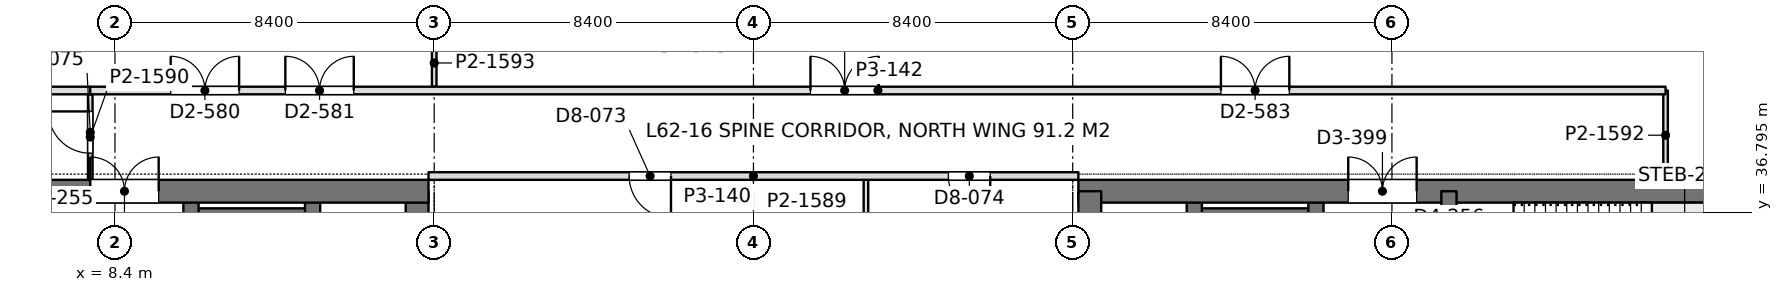
"""IFC4 building model, lengths in metres.
Left out: names, types, materials, properties, quantities, classifications, styles, units other than length and angle.
Written with IfcOpenShell. Run it as: python <this file> out.ifc"""

import sys

from ifc_helpers import new_model, si_unit, direction, frame, frame_2d, origin, place, context, subcontext, project, spatial, rectangle, extrude, element, fill, save


model = new_model("IFC4")
c1 = context("Model", 3, precision=1e-05, world=origin(), true_north=direction((0.0, 1.0)))
c2 = subcontext(c1, "Body", "Model", "MODEL_VIEW")
j1 = project(units=[si_unit("LENGTHUNIT", "METRE"), si_unit("PLANEANGLEUNIT", "RADIAN")], contexts=[c1])
p1 = place(None, origin())
s1 = spatial("IfcSite", under=j1, at=p1, CompositionType="ELEMENT")
p2 = place(p1, origin())
s2 = spatial("IfcBuilding", under=s1, at=p2, CompositionType="ELEMENT")
p3 = place(p2, frame((0.0, 0.0, 272.7)))
s3 = spatial("IfcBuildingStorey", under=s2, at=p3, CompositionType="ELEMENT", Elevation=272.7)
p4 = place(p3, frame((-1.05, 37.35, 0.0), z_axis=(0.0, 0.0, 1.0), x_axis=(1.0, 0.0, 0.0)))
e1 = element("IfcWall", 1, at=p4, inside=s3, PredefinedType="SHEAR", context=c2, shape_type="SweptSolid", body=[
    extrude(rectangle(XDim=17.7, YDim=0.6, at=frame_2d((8.85, 0.0))), origin(), (0.0, 0.0, 1.0), 4.5),
])
p5 = place(p4, frame((8.8, 0.0, 0.0)))
e2 = element("IfcOpeningElement", 2, at=p5, cuts=e1, PredefinedType="OPENING", context=c2, shape_type="SweptSolid", body=[
    extrude(rectangle(XDim=1.8, YDim=2.4, at=frame_2d((0.9, 1.2))), frame((0.0, 0.31, 0.0), z_axis=(0.0, -1.0, 0.0), x_axis=(1.0, 0.0, 0.0)), (0.0, 0.0, 1.0), 0.62),
])
p6 = place(p3, frame((16.35, 27.8, 0.0), z_axis=(0.0, 0.0, 1.0), x_axis=(0.0, 1.0, 0.0)))
e3 = element("IfcWall", 3, at=p6, inside=s3, PredefinedType="SHEAR", context=c2, shape_type="SweptSolid", body=[
    extrude(rectangle(XDim=9.55, YDim=0.6, at=frame_2d((4.775, 0.0))), origin(), (0.0, 0.0, 1.0), 4.5),
])
p7 = place(p3, frame((6.9, 13.05, 0.0), z_axis=(0.0, 0.0, 1.0), x_axis=(0.0, 1.0, 0.0)))
e4 = element("IfcWall", 4, at=p7, inside=s3, PredefinedType="SHEAR", context=c2, shape_type="SweptSolid", body=[
    extrude(rectangle(XDim=24.3, YDim=0.4, at=frame_2d((12.15, 0.0))), origin(), (0.0, 0.0, 1.0), 4.5),
])
p8 = place(p7, frame((1.3, 0.0, 0.0)))
e5 = element("IfcOpeningElement", 5, at=p8, cuts=e4, PredefinedType="OPENING", context=c2, shape_type="SweptSolid", body=[
    extrude(rectangle(XDim=1.0, YDim=2.2, at=frame_2d((0.5, 1.1))), frame((0.0, 0.21, 0.0), z_axis=(0.0, -1.0, 0.0), x_axis=(1.0, 0.0, 0.0)), (0.0, 0.0, 1.0), 0.42),
])
p9 = place(p7, frame((22.0, 0.0, 0.0)))
e6 = element("IfcOpeningElement", 6, at=p9, cuts=e4, PredefinedType="OPENING", context=c2, shape_type="SweptSolid", body=[
    extrude(rectangle(XDim=1.0, YDim=2.2, at=frame_2d((0.5, 1.1))), frame((0.0, 0.21, 0.0), z_axis=(0.0, -1.0, 0.0), x_axis=(1.0, 0.0, 0.0)), (0.0, 0.0, 1.0), 0.42),
])
p10 = place(p7, frame((5.55, 0.0, 0.0)))
e7 = element("IfcOpeningElement", 7, at=p10, cuts=e4, PredefinedType="OPENING", context=c2, shape_type="SweptSolid", body=[
    extrude(rectangle(XDim=1.0, YDim=2.2, at=frame_2d((0.5, 1.1))), frame((0.0, 0.21, 0.0), z_axis=(0.0, -1.0, 0.0), x_axis=(1.0, 0.0, 0.0)), (0.0, 0.0, 1.0), 0.42),
])
p11 = place(p7, frame((9.55, 0.0, 0.0)))
e8 = element("IfcOpeningElement", 8, at=p11, cuts=e4, PredefinedType="OPENING", context=c2, shape_type="SweptSolid", body=[
    extrude(rectangle(XDim=1.0, YDim=2.2, at=frame_2d((0.5, 1.1))), frame((0.0, 0.21, 0.0), z_axis=(0.0, -1.0, 0.0), x_axis=(1.0, 0.0, 0.0)), (0.0, 0.0, 1.0), 0.42),
])
p12 = place(p7, frame((12.8, 0.0, 0.0)))
e9 = element("IfcOpeningElement", 9, at=p12, cuts=e4, PredefinedType="OPENING", context=c2, shape_type="SweptSolid", body=[
    extrude(rectangle(XDim=1.1, YDim=2.2, at=frame_2d((0.55, 1.1))), frame((0.0, 0.21, 0.0), z_axis=(0.0, -1.0, 0.0), x_axis=(1.0, 0.0, 0.0)), (0.0, 0.0, 1.0), 0.42),
])
p13 = place(p7, frame((15.538, 0.0, 0.0)))
e10 = element("IfcOpeningElement", 10, at=p13, cuts=e4, PredefinedType="OPENING", context=c2, shape_type="SweptSolid", body=[
    extrude(rectangle(XDim=1.1, YDim=2.2, at=frame_2d((0.55, 1.1))), frame((0.0, 0.21, 0.0), z_axis=(0.0, -1.0, 0.0), x_axis=(1.0, 0.0, 0.0)), (0.0, 0.0, 1.0), 0.42),
])
p14 = place(p7, frame((18.262, 0.0, 0.0)))
e11 = element("IfcOpeningElement", 11, at=p14, cuts=e4, PredefinedType="OPENING", context=c2, shape_type="SweptSolid", body=[
    extrude(rectangle(XDim=1.1, YDim=2.2, at=frame_2d((0.55, 1.1))), frame((0.0, 0.21, 0.0), z_axis=(0.0, -1.0, 0.0), x_axis=(1.0, 0.0, 0.0)), (0.0, 0.0, 1.0), 0.42),
])
p15 = place(p3, frame((10.4, 13.05, 0.0), z_axis=(0.0, 0.0, 1.0), x_axis=(0.0, 1.0, 0.0)))
e12 = element("IfcWall", 12, at=p15, inside=s3, PredefinedType="SHEAR", context=c2, shape_type="SweptSolid", body=[
    extrude(rectangle(XDim=24.3, YDim=0.4, at=frame_2d((12.15, 0.0))), origin(), (0.0, 0.0, 1.0), 4.5),
])
p16 = place(p15, frame((15.75, 0.0, 0.0)))
e13 = element("IfcOpeningElement", 13, at=p16, cuts=e12, PredefinedType="OPENING", context=c2, shape_type="SweptSolid", body=[
    extrude(rectangle(XDim=1.1, YDim=2.2, at=frame_2d((0.55, 1.1))), frame((0.0, 0.21, 0.0), z_axis=(0.0, -1.0, 0.0), x_axis=(1.0, 0.0, 0.0)), (0.0, 0.0, 1.0), 0.42),
])
p17 = place(p15, frame((18.6, 0.0, 0.0)))
e14 = element("IfcOpeningElement", 14, at=p17, cuts=e12, PredefinedType="OPENING", context=c2, shape_type="SweptSolid", body=[
    extrude(rectangle(XDim=1.1, YDim=2.2, at=frame_2d((0.55, 1.1))), frame((0.0, 0.21, 0.0), z_axis=(0.0, -1.0, 0.0), x_axis=(1.0, 0.0, 0.0)), (0.0, 0.0, 1.0), 0.42),
])
p18 = place(p15, frame((21.45, 0.0, 0.0)))
e15 = element("IfcOpeningElement", 15, at=p18, cuts=e12, PredefinedType="OPENING", context=c2, shape_type="SweptSolid", body=[
    extrude(rectangle(XDim=1.1, YDim=2.2, at=frame_2d((0.55, 1.1))), frame((0.0, 0.21, 0.0), z_axis=(0.0, -1.0, 0.0), x_axis=(1.0, 0.0, 0.0)), (0.0, 0.0, 1.0), 0.42),
])
p19 = place(p15, frame((8.65, 0.0, 0.0)))
e16 = element("IfcOpeningElement", 16, at=p19, cuts=e12, PredefinedType="OPENING", context=c2, shape_type="SweptSolid", body=[
    extrude(rectangle(XDim=1.8, YDim=2.4, at=frame_2d((0.9, 1.2))), frame((0.0, 0.21, 0.0), z_axis=(0.0, -1.0, 0.0), x_axis=(1.0, 0.0, 0.0)), (0.0, 0.0, 1.0), 0.42),
])
p20 = place(p3, frame((13.6, 27.925, 0.0), z_axis=(0.0, 0.0, 1.0), x_axis=(0.0, 1.0, 0.0)))
e17 = element("IfcWall", 17, at=p20, inside=s3, PredefinedType="SHEAR", context=c2, shape_type="SweptSolid", body=[
    extrude(rectangle(XDim=9.425, YDim=0.4, at=frame_2d((4.712, 0.0))), origin(), (0.0, 0.0, 1.0), 4.5),
])
p21 = place(p3, frame((10.4, 36.625, 0.0), z_axis=(0.0, 0.0, 1.0), x_axis=(1.0, 0.0, 0.0)))
e18 = element("IfcWall", 18, at=p21, inside=s3, PredefinedType="SHEAR", context=c2, shape_type="SweptSolid", body=[
    extrude(rectangle(XDim=3.2, YDim=0.55, at=frame_2d((1.6, 0.0))), origin(), (0.0, 0.0, 1.0), 4.5),
])
p22 = place(p3, frame((33.75, 37.35, 0.0), z_axis=(0.0, 0.0, 1.0), x_axis=(1.0, 0.0, 0.0)))
e19 = element("IfcWall", 19, at=p22, inside=s3, PredefinedType="SHEAR", context=c2, shape_type="SweptSolid", body=[
    extrude(rectangle(XDim=17.7, YDim=0.6, at=frame_2d((8.85, 0.0))), origin(), (0.0, 0.0, 1.0), 4.5),
])
p23 = place(p22, frame((7.1, 0.0, 0.0)))
e20 = element("IfcOpeningElement", 20, at=p23, cuts=e19, PredefinedType="OPENING", context=c2, shape_type="SweptSolid", body=[
    extrude(rectangle(XDim=1.8, YDim=2.4, at=frame_2d((0.9, 1.2))), frame((0.0, 0.31, 0.0), z_axis=(0.0, -1.0, 0.0), x_axis=(1.0, 0.0, 0.0)), (0.0, 0.0, 1.0), 0.62),
])
p24 = place(p3, frame((34.05, 27.8, 0.0), z_axis=(0.0, 0.0, 1.0), x_axis=(0.0, 1.0, 0.0)))
e21 = element("IfcWall", 21, at=p24, inside=s3, PredefinedType="SHEAR", context=c2, shape_type="SweptSolid", body=[
    extrude(rectangle(XDim=9.55, YDim=0.6, at=frame_2d((4.775, 0.0))), origin(), (0.0, 0.0, 1.0), 4.5),
])
p25 = place(p3, frame((43.5, 13.05, 0.0), z_axis=(0.0, 0.0, 1.0), x_axis=(0.0, 1.0, 0.0)))
e22 = element("IfcWall", 22, at=p25, inside=s3, PredefinedType="SHEAR", context=c2, shape_type="SweptSolid", body=[
    extrude(rectangle(XDim=24.3, YDim=0.4, at=frame_2d((12.15, 0.0))), origin(), (0.0, 0.0, 1.0), 4.5),
])
p26 = place(p25, frame((1.3, 0.0, 0.0)))
e23 = element("IfcOpeningElement", 23, at=p26, cuts=e22, PredefinedType="OPENING", context=c2, shape_type="SweptSolid", body=[
    extrude(rectangle(XDim=1.0, YDim=2.2, at=frame_2d((0.5, 1.1))), frame((0.0, 0.21, 0.0), z_axis=(0.0, -1.0, 0.0), x_axis=(1.0, 0.0, 0.0)), (0.0, 0.0, 1.0), 0.42),
])
p27 = place(p25, frame((22.0, 0.0, 0.0)))
e24 = element("IfcOpeningElement", 24, at=p27, cuts=e22, PredefinedType="OPENING", context=c2, shape_type="SweptSolid", body=[
    extrude(rectangle(XDim=1.0, YDim=2.2, at=frame_2d((0.5, 1.1))), frame((0.0, 0.21, 0.0), z_axis=(0.0, -1.0, 0.0), x_axis=(1.0, 0.0, 0.0)), (0.0, 0.0, 1.0), 0.42),
])
p28 = place(p25, frame((5.55, 0.0, 0.0)))
e25 = element("IfcOpeningElement", 25, at=p28, cuts=e22, PredefinedType="OPENING", context=c2, shape_type="SweptSolid", body=[
    extrude(rectangle(XDim=1.0, YDim=2.2, at=frame_2d((0.5, 1.1))), frame((0.0, 0.21, 0.0), z_axis=(0.0, -1.0, 0.0), x_axis=(1.0, 0.0, 0.0)), (0.0, 0.0, 1.0), 0.42),
])
p29 = place(p25, frame((9.55, 0.0, 0.0)))
e26 = element("IfcOpeningElement", 26, at=p29, cuts=e22, PredefinedType="OPENING", context=c2, shape_type="SweptSolid", body=[
    extrude(rectangle(XDim=1.0, YDim=2.2, at=frame_2d((0.5, 1.1))), frame((0.0, 0.21, 0.0), z_axis=(0.0, -1.0, 0.0), x_axis=(1.0, 0.0, 0.0)), (0.0, 0.0, 1.0), 0.42),
])
p30 = place(p25, frame((12.8, 0.0, 0.0)))
e27 = element("IfcOpeningElement", 27, at=p30, cuts=e22, PredefinedType="OPENING", context=c2, shape_type="SweptSolid", body=[
    extrude(rectangle(XDim=1.1, YDim=2.2, at=frame_2d((0.55, 1.1))), frame((0.0, 0.21, 0.0), z_axis=(0.0, -1.0, 0.0), x_axis=(1.0, 0.0, 0.0)), (0.0, 0.0, 1.0), 0.42),
])
p31 = place(p25, frame((15.538, 0.0, 0.0)))
e28 = element("IfcOpeningElement", 28, at=p31, cuts=e22, PredefinedType="OPENING", context=c2, shape_type="SweptSolid", body=[
    extrude(rectangle(XDim=1.1, YDim=2.2, at=frame_2d((0.55, 1.1))), frame((0.0, 0.21, 0.0), z_axis=(0.0, -1.0, 0.0), x_axis=(1.0, 0.0, 0.0)), (0.0, 0.0, 1.0), 0.42),
])
p32 = place(p25, frame((18.262, 0.0, 0.0)))
e29 = element("IfcOpeningElement", 29, at=p32, cuts=e22, PredefinedType="OPENING", context=c2, shape_type="SweptSolid", body=[
    extrude(rectangle(XDim=1.1, YDim=2.2, at=frame_2d((0.55, 1.1))), frame((0.0, 0.21, 0.0), z_axis=(0.0, -1.0, 0.0), x_axis=(1.0, 0.0, 0.0)), (0.0, 0.0, 1.0), 0.42),
])
p33 = place(p3, frame((40.0, 13.05, 0.0), z_axis=(0.0, 0.0, 1.0), x_axis=(0.0, 1.0, 0.0)))
e30 = element("IfcWall", 30, at=p33, inside=s3, PredefinedType="SHEAR", context=c2, shape_type="SweptSolid", body=[
    extrude(rectangle(XDim=24.3, YDim=0.4, at=frame_2d((12.15, 0.0))), origin(), (0.0, 0.0, 1.0), 4.5),
])
p34 = place(p33, frame((15.75, 0.0, 0.0)))
e31 = element("IfcOpeningElement", 31, at=p34, cuts=e30, PredefinedType="OPENING", context=c2, shape_type="SweptSolid", body=[
    extrude(rectangle(XDim=1.1, YDim=2.2, at=frame_2d((0.55, 1.1))), frame((0.0, 0.21, 0.0), z_axis=(0.0, -1.0, 0.0), x_axis=(1.0, 0.0, 0.0)), (0.0, 0.0, 1.0), 0.42),
])
p35 = place(p33, frame((18.6, 0.0, 0.0)))
e32 = element("IfcOpeningElement", 32, at=p35, cuts=e30, PredefinedType="OPENING", context=c2, shape_type="SweptSolid", body=[
    extrude(rectangle(XDim=1.1, YDim=2.2, at=frame_2d((0.55, 1.1))), frame((0.0, 0.21, 0.0), z_axis=(0.0, -1.0, 0.0), x_axis=(1.0, 0.0, 0.0)), (0.0, 0.0, 1.0), 0.42),
])
p36 = place(p33, frame((21.45, 0.0, 0.0)))
e33 = element("IfcOpeningElement", 33, at=p36, cuts=e30, PredefinedType="OPENING", context=c2, shape_type="SweptSolid", body=[
    extrude(rectangle(XDim=1.1, YDim=2.2, at=frame_2d((0.55, 1.1))), frame((0.0, 0.21, 0.0), z_axis=(0.0, -1.0, 0.0), x_axis=(1.0, 0.0, 0.0)), (0.0, 0.0, 1.0), 0.42),
])
p37 = place(p33, frame((8.65, 0.0, 0.0)))
e34 = element("IfcOpeningElement", 34, at=p37, cuts=e30, PredefinedType="OPENING", context=c2, shape_type="SweptSolid", body=[
    extrude(rectangle(XDim=1.8, YDim=2.4, at=frame_2d((0.9, 1.2))), frame((0.0, 0.21, 0.0), z_axis=(0.0, -1.0, 0.0), x_axis=(1.0, 0.0, 0.0)), (0.0, 0.0, 1.0), 0.42),
])
p38 = place(p33, frame((1.5, 0.0, 0.0)))
e35 = element("IfcOpeningElement", 35, at=p38, cuts=e30, PredefinedType="OPENING", context=c2, shape_type="SweptSolid", body=[
    extrude(rectangle(XDim=1.8, YDim=2.4, at=frame_2d((0.9, 1.2))), frame((0.0, 0.21, 0.0), z_axis=(0.0, -1.0, 0.0), x_axis=(1.0, 0.0, 0.0)), (0.0, 0.0, 1.0), 0.42),
])
p39 = place(p3, frame((36.8, 27.925, 0.0), z_axis=(0.0, 0.0, 1.0), x_axis=(0.0, 1.0, 0.0)))
e36 = element("IfcWall", 36, at=p39, inside=s3, PredefinedType="SHEAR", context=c2, shape_type="SweptSolid", body=[
    extrude(rectangle(XDim=9.425, YDim=0.4, at=frame_2d((4.712, 0.0))), origin(), (0.0, 0.0, 1.0), 4.5),
])
p40 = place(p3, frame((40.0, 36.625, 0.0), z_axis=(0.0, 0.0, 1.0), x_axis=(-1.0, 0.0, 0.0)))
e37 = element("IfcWall", 37, at=p40, inside=s3, PredefinedType="SHEAR", context=c2, shape_type="SweptSolid", body=[
    extrude(rectangle(XDim=3.2, YDim=0.55, at=frame_2d((1.6, 0.0))), origin(), (0.0, 0.0, 1.0), 4.5),
])
p41 = place(p3, frame((16.8, 40.098, 0.0), z_axis=(0.0, 0.0, 1.0), x_axis=(0.0, 1.0, 0.0)))
e38 = element("IfcWall", 38, at=p41, inside=s3, PredefinedType="PARTITIONING", context=c2, shape_type="SweptSolid", body=[
    extrude(rectangle(XDim=1.253, YDim=0.12, at=frame_2d((0.626, 0.0))), origin(), (0.0, 0.0, 1.0), 3.99),
])
p42 = place(p3, frame((7.748, 40.0, 0.0), z_axis=(0.0, 0.0, 1.0), x_axis=(1.0, 0.0, 0.0)))
e39 = element("IfcWall", 39, at=p42, inside=s3, PredefinedType="PARTITIONING", context=c2, shape_type="SweptSolid", body=[
    extrude(rectangle(XDim=41.452, YDim=0.2, at=frame_2d((20.726, 0.0))), origin(), (0.0, 0.0, 1.0), 3.8),
])
p43 = place(p42, frame((2.119, 0.0, 0.0)))
e40 = element("IfcOpeningElement", 40, at=p43, cuts=e39, PredefinedType="OPENING", context=c2, shape_type="SweptSolid", body=[
    extrude(rectangle(XDim=1.8, YDim=2.2, at=frame_2d((0.9, 1.1))), frame((0.0, 0.11, 0.0), z_axis=(0.0, -1.0, 0.0), x_axis=(1.0, 0.0, 0.0)), (0.0, 0.0, 1.0), 0.22),
])
p44 = place(p42, frame((5.135, 0.0, 0.0)))
e41 = element("IfcOpeningElement", 41, at=p44, cuts=e39, PredefinedType="OPENING", context=c2, shape_type="SweptSolid", body=[
    extrude(rectangle(XDim=1.8, YDim=2.2, at=frame_2d((0.9, 1.1))), frame((0.0, 0.11, 0.0), z_axis=(0.0, -1.0, 0.0), x_axis=(1.0, 0.0, 0.0)), (0.0, 0.0, 1.0), 0.22),
])
p45 = place(p42, frame((18.952, 0.0, 0.0)))
e42 = element("IfcOpeningElement", 42, at=p45, cuts=e39, PredefinedType="OPENING", context=c2, shape_type="SweptSolid", body=[
    extrude(rectangle(XDim=1.8, YDim=2.2, at=frame_2d((0.9, 1.1))), frame((0.0, 0.11, 0.0), z_axis=(0.0, -1.0, 0.0), x_axis=(1.0, 0.0, 0.0)), (0.0, 0.0, 1.0), 0.22),
])
p46 = place(p42, frame((29.752, 0.0, 0.0)))
e43 = element("IfcOpeningElement", 43, at=p46, cuts=e39, PredefinedType="OPENING", context=c2, shape_type="SweptSolid", body=[
    extrude(rectangle(XDim=1.8, YDim=2.2, at=frame_2d((0.9, 1.1))), frame((0.0, 0.11, 0.0), z_axis=(0.0, -1.0, 0.0), x_axis=(1.0, 0.0, 0.0)), (0.0, 0.0, 1.0), 0.22),
])
p47 = place(p3, frame((7.75, 37.648, 0.0), z_axis=(0.0, 0.0, 1.0), x_axis=(0.0, 1.0, 0.0)))
e44 = element("IfcWall", 44, at=p47, inside=s3, PredefinedType="PARTITIONING", context=c2, shape_type="SweptSolid", body=[
    extrude(rectangle(XDim=2.254, YDim=0.12, at=frame_2d((1.127, 0.0))), origin(), (0.0, 0.0, 1.0), 4.35),
])
p48 = place(p47, frame((0.702, 0.0, 0.0)))
e45 = element("IfcOpeningElement", 45, at=p48, cuts=e44, PredefinedType="OPENING", context=c2, shape_type="SweptSolid", body=[
    extrude(rectangle(XDim=1.1, YDim=2.4, at=frame_2d((0.55, 1.2))), frame((0.0, 0.07, 0.0), z_axis=(0.0, -1.0, 0.0), x_axis=(1.0, 0.0, 0.0)), (0.0, 0.0, 1.0), 0.14),
])
p49 = place(p3, frame((49.2, 37.648, 0.0), z_axis=(0.0, 0.0, 1.0), x_axis=(0.0, 1.0, 0.0)))
e46 = element("IfcWall", 46, at=p49, inside=s3, PredefinedType="PARTITIONING", context=c2, shape_type="SweptSolid", body=[
    extrude(rectangle(XDim=2.352, YDim=0.12, at=frame_2d((1.176, 0.0))), origin(), (0.0, 0.0, 1.0), 4.35),
])
p50 = place(p3, frame((1.2, 40.0, 0.0), z_axis=(0.0, 0.0, 1.0), x_axis=(1.0, 0.0, 0.0)))
e47 = element("IfcWall", 47, at=p50, inside=s3, PredefinedType="PARTITIONING", context=c2, shape_type="SweptSolid", body=[
    extrude(rectangle(XDim=6.552, YDim=0.2, at=frame_2d((3.276, 0.0))), origin(), (0.0, 0.0, 1.0), 3.99),
])
p51 = place(p3, frame((28.16, 33.298, 0.0), z_axis=(0.0, 0.0, 1.0), x_axis=(0.0, 1.0, 0.0)))
e48 = element("IfcWall", 48, at=p51, inside=s3, PredefinedType="PARTITIONING", context=c2, shape_type="SweptSolid", body=[
    extrude(rectangle(XDim=4.404, YDim=0.12, at=frame_2d((2.202, 0.0))), origin(), (0.0, 0.0, 1.0), 3.66),
])
p52 = place(p3, frame((16.65, 37.75, 0.0), z_axis=(0.0, 0.0, 1.0), x_axis=(1.0, 0.0, 0.0)))
e49 = element("IfcWall", 49, at=p52, inside=s3, PredefinedType="PARTITIONING", context=c2, shape_type="SweptSolid", body=[
    extrude(rectangle(XDim=17.1, YDim=0.2, at=frame_2d((8.55, 0.0))), origin(), (0.0, 0.0, 1.0), 3.8),
])
p53 = place(p52, frame((5.28, 0.0, 0.0)))
e50 = element("IfcOpeningElement", 50, at=p53, cuts=e49, PredefinedType="OPENING", context=c2, shape_type="SweptSolid", body=[
    extrude(rectangle(XDim=1.1, YDim=2.4, at=frame_2d((0.55, 1.2))), frame((0.0, 0.11, 0.0), z_axis=(0.0, -1.0, 0.0), x_axis=(1.0, 0.0, 0.0)), (0.0, 0.0, 1.0), 0.22),
])
p54 = place(p52, frame((13.68, 0.0, 0.0)))
e51 = element("IfcOpeningElement", 51, at=p54, cuts=e49, PredefinedType="OPENING", context=c2, shape_type="SweptSolid", body=[
    extrude(rectangle(XDim=1.1, YDim=2.4, at=frame_2d((0.55, 1.2))), frame((0.0, 0.11, 0.0), z_axis=(0.0, -1.0, 0.0), x_axis=(1.0, 0.0, 0.0)), (0.0, 0.0, 1.0), 0.22),
])
p55 = place(p5, origin())
e52 = element("IfcDoor", 52, at=p55, inside=s3, OperationType="DOUBLE_DOOR_SINGLE_SWING", PredefinedType="DOOR", context=c2, shape_type="SweptSolid", body=[
    extrude(rectangle(XDim=1.8, YDim=2.4, at=frame_2d((0.9, 1.2))), frame((0.0, 0.025, 0.0), z_axis=(0.0, -1.0, 0.0), x_axis=(1.0, 0.0, 0.0)), (0.0, 0.0, 1.0), 0.05),
])
fill(e2, e52)
p56 = place(p23, origin())
e53 = element("IfcDoor", 53, at=p56, inside=s3, OperationType="DOUBLE_DOOR_SINGLE_SWING", PredefinedType="DOOR", context=c2, shape_type="SweptSolid", body=[
    extrude(rectangle(XDim=1.8, YDim=2.4, at=frame_2d((0.9, 1.2))), frame((0.0, 0.025, 0.0), z_axis=(0.0, -1.0, 0.0), x_axis=(1.0, 0.0, 0.0)), (0.0, 0.0, 1.0), 0.05),
])
fill(e20, e53)
p57 = place(p43, origin())
e54 = element("IfcDoor", 54, at=p57, inside=s3, OperationType="DOUBLE_DOOR_SINGLE_SWING", PredefinedType="DOOR", context=c2, shape_type="SweptSolid", body=[
    extrude(rectangle(XDim=1.8, YDim=2.2, at=frame_2d((0.9, 1.1))), frame((0.0, 0.025, 0.0), z_axis=(0.0, -1.0, 0.0), x_axis=(1.0, 0.0, 0.0)), (0.0, 0.0, 1.0), 0.05),
])
fill(e40, e54)
p58 = place(p44, origin())
e55 = element("IfcDoor", 55, at=p58, inside=s3, OperationType="DOUBLE_DOOR_SINGLE_SWING", PredefinedType="DOOR", context=c2, shape_type="SweptSolid", body=[
    extrude(rectangle(XDim=1.8, YDim=2.2, at=frame_2d((0.9, 1.1))), frame((0.0, 0.025, 0.0), z_axis=(0.0, -1.0, 0.0), x_axis=(1.0, 0.0, 0.0)), (0.0, 0.0, 1.0), 0.05),
])
fill(e41, e55)
p59 = place(p45, origin())
e56 = element("IfcDoor", 56, at=p59, inside=s3, OperationType="DOUBLE_DOOR_SINGLE_SWING", PredefinedType="DOOR", context=c2, shape_type="SweptSolid", body=[
    extrude(rectangle(XDim=1.8, YDim=2.2, at=frame_2d((0.9, 1.1))), frame((0.0, 0.025, 0.0), z_axis=(0.0, -1.0, 0.0), x_axis=(1.0, 0.0, 0.0)), (0.0, 0.0, 1.0), 0.05),
])
fill(e42, e56)
p60 = place(p46, origin())
e57 = element("IfcDoor", 57, at=p60, inside=s3, OperationType="DOUBLE_DOOR_SINGLE_SWING", PredefinedType="DOOR", context=c2, shape_type="SweptSolid", body=[
    extrude(rectangle(XDim=1.8, YDim=2.2, at=frame_2d((0.9, 1.1))), frame((0.0, 0.025, 0.0), z_axis=(0.0, -1.0, 0.0), x_axis=(1.0, 0.0, 0.0)), (0.0, 0.0, 1.0), 0.05),
])
fill(e43, e57)
p61 = place(p48, origin())
e58 = element("IfcDoor", 58, at=p61, inside=s3, OperationType="SINGLE_SWING_RIGHT", PredefinedType="DOOR", context=c2, shape_type="SweptSolid", body=[
    extrude(rectangle(XDim=1.1, YDim=2.4, at=frame_2d((0.55, 1.2))), frame((0.0, 0.025, 0.0), z_axis=(0.0, -1.0, 0.0), x_axis=(1.0, 0.0, 0.0)), (0.0, 0.0, 1.0), 0.05),
])
fill(e45, e58)
p62 = place(p53, frame((1.1, 0.0, 0.0), z_axis=(0.0, 0.0, 1.0), x_axis=(-1.0, 0.0, 0.0)))
e59 = element("IfcDoor", 59, at=p62, inside=s3, OperationType="SINGLE_SWING_LEFT", PredefinedType="DOOR", context=c2, shape_type="SweptSolid", body=[
    extrude(rectangle(XDim=1.1, YDim=2.4, at=frame_2d((0.55, 1.2))), frame((0.0, 0.025, 0.0), z_axis=(0.0, -1.0, 0.0), x_axis=(1.0, 0.0, 0.0)), (0.0, 0.0, 1.0), 0.05),
])
fill(e50, e59)
p63 = place(p54, frame((1.1, 0.0, 0.0), z_axis=(0.0, 0.0, 1.0), x_axis=(-1.0, 0.0, 0.0)))
e60 = element("IfcDoor", 60, at=p63, inside=s3, OperationType="SINGLE_SWING_LEFT", PredefinedType="DOOR", context=c2, shape_type="SweptSolid", body=[
    extrude(rectangle(XDim=1.1, YDim=2.4, at=frame_2d((0.55, 1.2))), frame((0.0, 0.025, 0.0), z_axis=(0.0, -1.0, 0.0), x_axis=(1.0, 0.0, 0.0)), (0.0, 0.0, 1.0), 0.05),
])
fill(e51, e60)
save(model, sys.argv[1])
